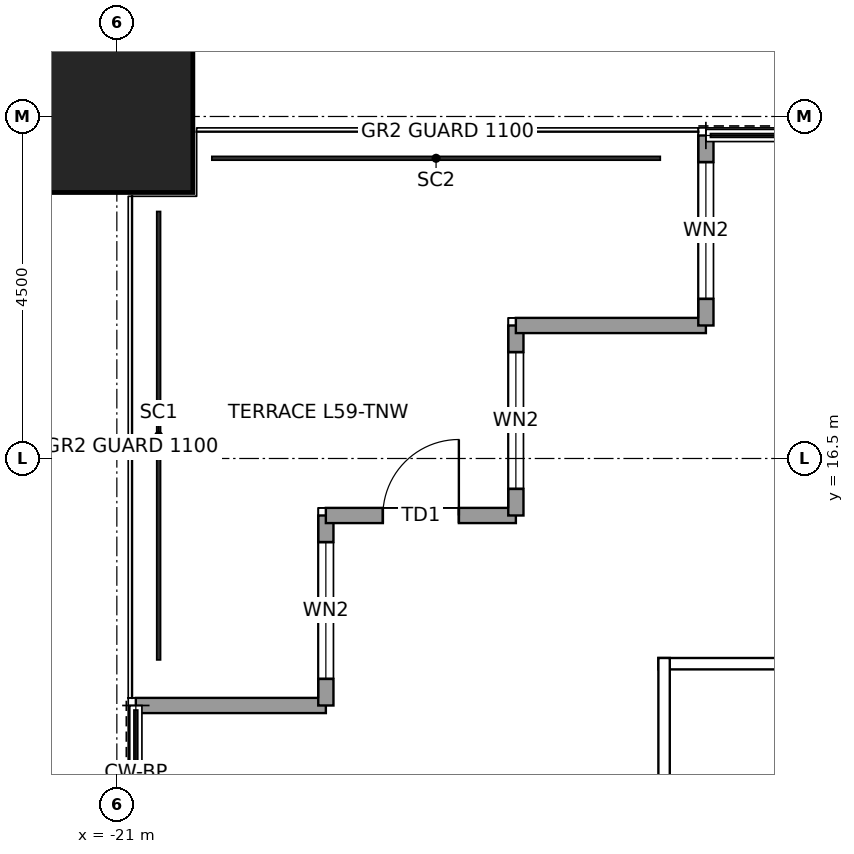
"""IFC4 building model, lengths in metres.
Left out: names, types, materials, properties, quantities, classifications, styles, units other than length and angle.
Written with IfcOpenShell. Run it as: python <this file> out.ifc"""

import sys

from ifc_helpers import new_model, si_unit, direction, frame, frame_2d, origin, origin_2d, place, context, subcontext, project, spatial, rectangle, hollow_rectangle, extrude, element, fill, save


model = new_model("IFC4")
c1 = context("Model", 3, precision=1e-05, world=origin(), true_north=direction((0.0, 1.0)))
c2 = subcontext(c1, "Body", "Model", "MODEL_VIEW")
j1 = project(units=[si_unit("LENGTHUNIT", "METRE"), si_unit("PLANEANGLEUNIT", "RADIAN")], contexts=[c1])
p1 = place(None, origin())
s1 = spatial("IfcSite", under=j1, at=p1, CompositionType="ELEMENT")
p2 = place(p1, origin())
s2 = spatial("IfcBuilding", under=s1, at=p2, CompositionType="ELEMENT")
p3 = place(p2, frame((0.0, 0.0, 271.9)))
s3 = spatial("IfcBuildingStorey", under=s2, at=p3, CompositionType="ELEMENT", Elevation=271.9)
p4 = place(p3, frame((-21.0, 21.0, 0.0), z_axis=(0.0, 0.0, 1.0), x_axis=(1.0, 0.0, 0.0)))
e1 = element("IfcColumn", 1, at=p4, inside=s3, PredefinedType="COLUMN", context=c2, shape_type="SweptSolid", body=[
    extrude(hollow_rectangle(XDim=2.0, YDim=2.0, WallThickness=0.095, at=origin_2d()), origin(), (0.0, 0.0, 1.0), 4.0),
])
p5 = place(p3, frame((-20.75, 13.25, 0.0), z_axis=(0.0, 0.0, 1.0), x_axis=(1.0, 0.0, 0.0)))
e2 = element("IfcWall", 2, at=p5, inside=s3, PredefinedType="SOLIDWALL", context=c2, shape_type="SweptSolid", body=[
    extrude(rectangle(XDim=2.5, YDim=0.2, at=frame_2d((1.25, 0.0))), origin(), (0.0, 0.0, 1.0), 3.85),
])
p6 = place(p3, frame((-18.25, 13.25, 0.0), z_axis=(0.0, 0.0, 1.0), x_axis=(0.0, 1.0, 0.0)))
e3 = element("IfcWall", 3, at=p6, inside=s3, PredefinedType="SOLIDWALL", context=c2, shape_type="SweptSolid", body=[
    extrude(rectangle(XDim=2.5, YDim=0.2, at=frame_2d((1.25, 0.0))), origin(), (0.0, 0.0, 1.0), 3.85),
])
p7 = place(p6, frame((0.35, 0.0, 0.3)))
e4 = element("IfcOpeningElement", 4, at=p7, cuts=e3, PredefinedType="OPENING", context=c2, shape_type="SweptSolid", body=[
    extrude(rectangle(XDim=1.8, YDim=2.4, at=frame_2d((0.9, 1.2))), frame((0.0, 0.11, 0.0), z_axis=(0.0, -1.0, 0.0), x_axis=(1.0, 0.0, 0.0)), (0.0, 0.0, 1.0), 0.22),
])
p8 = place(p3, frame((-18.25, 15.75, 0.0), z_axis=(0.0, 0.0, 1.0), x_axis=(1.0, 0.0, 0.0)))
e5 = element("IfcWall", 5, at=p8, inside=s3, PredefinedType="SOLIDWALL", context=c2, shape_type="SweptSolid", body=[
    extrude(rectangle(XDim=2.5, YDim=0.2, at=frame_2d((1.25, 0.0))), origin(), (0.0, 0.0, 1.0), 3.317),
])
p9 = place(p8, frame((0.75, 0.0, 0.0)))
e6 = element("IfcOpeningElement", 6, at=p9, cuts=e5, PredefinedType="OPENING", context=c2, shape_type="SweptSolid", body=[
    extrude(rectangle(XDim=1.0, YDim=2.4, at=frame_2d((0.5, 1.2))), frame((0.0, 0.11, 0.0), z_axis=(0.0, -1.0, 0.0), x_axis=(1.0, 0.0, 0.0)), (0.0, 0.0, 1.0), 0.22),
])
p10 = place(p3, frame((-15.75, 15.75, 0.0), z_axis=(0.0, 0.0, 1.0), x_axis=(0.0, 1.0, 0.0)))
e7 = element("IfcWall", 7, at=p10, inside=s3, PredefinedType="SOLIDWALL", context=c2, shape_type="SweptSolid", body=[
    extrude(rectangle(XDim=2.5, YDim=0.2, at=frame_2d((1.25, 0.0))), origin(), (0.0, 0.0, 1.0), 3.85),
])
p11 = place(p10, frame((0.35, 0.0, 0.3)))
e8 = element("IfcOpeningElement", 8, at=p11, cuts=e7, PredefinedType="OPENING", context=c2, shape_type="SweptSolid", body=[
    extrude(rectangle(XDim=1.8, YDim=2.4, at=frame_2d((0.9, 1.2))), frame((0.0, 0.11, 0.0), z_axis=(0.0, -1.0, 0.0), x_axis=(1.0, 0.0, 0.0)), (0.0, 0.0, 1.0), 0.22),
])
p12 = place(p3, frame((-15.75, 18.25, 0.0), z_axis=(0.0, 0.0, 1.0), x_axis=(1.0, 0.0, 0.0)))
e9 = element("IfcWall", 9, at=p12, inside=s3, PredefinedType="SOLIDWALL", context=c2, shape_type="SweptSolid", body=[
    extrude(rectangle(XDim=2.5, YDim=0.2, at=frame_2d((1.25, 0.0))), origin(), (0.0, 0.0, 1.0), 3.85),
])
p13 = place(p3, frame((-13.25, 18.25, 0.0), z_axis=(0.0, 0.0, 1.0), x_axis=(0.0, 1.0, 0.0)))
e10 = element("IfcWall", 10, at=p13, inside=s3, PredefinedType="SOLIDWALL", context=c2, shape_type="SweptSolid", body=[
    extrude(rectangle(XDim=2.5, YDim=0.2, at=frame_2d((1.25, 0.0))), origin(), (0.0, 0.0, 1.0), 3.85),
])
p14 = place(p13, frame((0.35, 0.0, 0.3)))
e11 = element("IfcOpeningElement", 11, at=p14, cuts=e10, PredefinedType="OPENING", context=c2, shape_type="SweptSolid", body=[
    extrude(rectangle(XDim=1.8, YDim=2.4, at=frame_2d((0.9, 1.2))), frame((0.0, 0.11, 0.0), z_axis=(0.0, -1.0, 0.0), x_axis=(1.0, 0.0, 0.0)), (0.0, 0.0, 1.0), 0.22),
])
p15 = place(p3, frame((-13.875, 13.8, 0.0), z_axis=(0.0, 0.0, 1.0), x_axis=(1.0, 0.0, 0.0)))
e12 = element("IfcWall", 12, at=p15, inside=s3, PredefinedType="PARTITIONING", context=c2, shape_type="SweptSolid", body=[
    extrude(rectangle(XDim=27.75, YDim=0.15, at=frame_2d((13.875, 0.0))), origin(), (0.0, 0.0, 1.0), 3.85),
])
p16 = place(p15, frame((20.275, 0.0, 0.0)))
e13 = element("IfcOpeningElement", 13, at=p16, cuts=e12, PredefinedType="OPENING", context=c2, shape_type="SweptSolid", body=[
    extrude(rectangle(XDim=1.0, YDim=2.4, at=frame_2d((0.5, 1.2))), frame((0.0, 0.085, 0.0), z_axis=(0.0, -1.0, 0.0), x_axis=(1.0, 0.0, 0.0)), (0.0, 0.0, 1.0), 0.17),
])
p17 = place(p3, frame((-13.8, -13.875, 0.0), z_axis=(0.0, 0.0, 1.0), x_axis=(0.0, 1.0, 0.0)))
e14 = element("IfcWall", 14, at=p17, inside=s3, PredefinedType="PARTITIONING", context=c2, shape_type="SweptSolid", body=[
    extrude(rectangle(XDim=27.75, YDim=0.15, at=frame_2d((13.875, 0.0))), origin(), (0.0, 0.0, 1.0), 3.85),
])
p18 = place(p7, origin())
e15 = element("IfcWindow", 15, at=p18, inside=s3, PartitioningType="SINGLE_PANEL", PredefinedType="WINDOW", context=c2, shape_type="SweptSolid", body=[
    extrude(rectangle(XDim=1.8, YDim=2.4, at=frame_2d((0.9, 1.2))), frame((0.0, 0.03, 0.0), z_axis=(0.0, -1.0, 0.0), x_axis=(1.0, 0.0, 0.0)), (0.0, 0.0, 1.0), 0.06),
])
fill(e4, e15)
p19 = place(p9, origin())
e16 = element("IfcDoor", 16, at=p19, inside=s3, OperationType="SINGLE_SWING_RIGHT", PredefinedType="DOOR", context=c2, shape_type="SweptSolid", body=[
    extrude(rectangle(XDim=1.0, YDim=2.4, at=frame_2d((0.5, 1.2))), frame((0.0, 0.025, 0.0), z_axis=(0.0, -1.0, 0.0), x_axis=(1.0, 0.0, 0.0)), (0.0, 0.0, 1.0), 0.05),
])
fill(e6, e16)
p20 = place(p11, origin())
e17 = element("IfcWindow", 17, at=p20, inside=s3, PartitioningType="SINGLE_PANEL", PredefinedType="WINDOW", context=c2, shape_type="SweptSolid", body=[
    extrude(rectangle(XDim=1.8, YDim=2.4, at=frame_2d((0.9, 1.2))), frame((0.0, 0.03, 0.0), z_axis=(0.0, -1.0, 0.0), x_axis=(1.0, 0.0, 0.0)), (0.0, 0.0, 1.0), 0.06),
])
fill(e8, e17)
p21 = place(p14, origin())
e18 = element("IfcWindow", 18, at=p21, inside=s3, PartitioningType="SINGLE_PANEL", PredefinedType="WINDOW", context=c2, shape_type="SweptSolid", body=[
    extrude(rectangle(XDim=1.8, YDim=2.4, at=frame_2d((0.9, 1.2))), frame((0.0, 0.03, 0.0), z_axis=(0.0, -1.0, 0.0), x_axis=(1.0, 0.0, 0.0)), (0.0, 0.0, 1.0), 0.06),
])
fill(e11, e18)
save(model, sys.argv[1])
